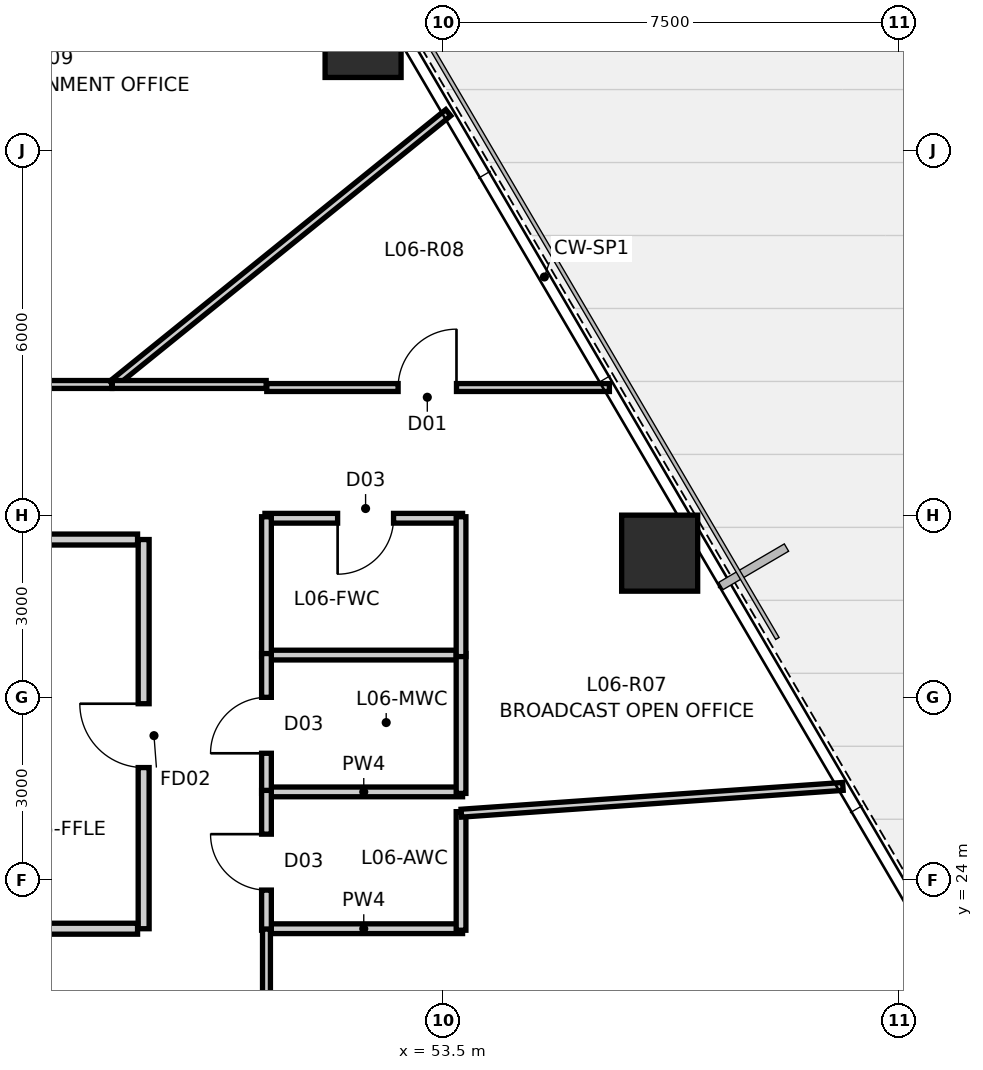
"""IFC4 building model, lengths in metres.
Left out: names, types, materials, properties, quantities, classifications, styles, units other than length and angle.
Written with IfcOpenShell. Run it as: python <this file> out.ifc"""

import sys

from ifc_helpers import new_model, si_unit, direction, frame, frame_2d, origin, origin_2d, place, context, subcontext, project, spatial, rectangle, hollow_rectangle, extrude, source, transform, mapped, element, fill, save


model = new_model("IFC4")
c1 = context("Model", 3, precision=1e-05, world=origin(), true_north=direction((0.0, 1.0)))
c2 = subcontext(c1, "Body", "Model", "MODEL_VIEW")
j1 = project(units=[si_unit("LENGTHUNIT", "METRE"), si_unit("PLANEANGLEUNIT", "RADIAN")], contexts=[c1])
p1 = place(None, origin())
s1 = spatial("IfcSite", under=j1, at=p1, CompositionType="ELEMENT")
p2 = place(p1, origin())
s2 = spatial("IfcBuilding", under=s1, at=p2, CompositionType="ELEMENT")
p3 = place(p2, frame((0.0, 0.0, 27.6)))
s3 = spatial("IfcBuildingStorey", under=s2, at=p3, CompositionType="ELEMENT", Elevation=27.6)
m1 = source(origin(), c2, "Body", "SweptSolid", [
    extrude(hollow_rectangle(XDim=1.25, YDim=1.25, WallThickness=0.07, at=origin_2d()), origin(), (0.0, 0.0, 1.0), 3.651),
])
p4 = place(p3, frame((57.066, 29.376, 0.0), z_axis=(-0.014913313399, -0.013776424037, 0.999793880369), x_axis=(0.678553674548, -0.734550822447, 0.0)))
e1 = element("IfcColumn", 1, at=p4, inside=s3, PredefinedType="COLUMN", context=c2, shape_type="MappedRepresentation", body=[
    mapped(m1, transform((0.0, 0.0, 0.0), scale=1.0)),
])
m2 = source(origin(), c2, "Body", "SweptSolid", [
    extrude(hollow_rectangle(XDim=1.25, YDim=1.25, WallThickness=0.07, at=origin_2d()), origin(), (0.0, 0.0, 1.0), 3.901),
])
p5 = place(p3, frame((52.189, 37.824, -0.25), z_axis=(-0.018151222073, -0.005633137885, 0.999819384136), x_axis=(0.296399214872, -0.955064136811, 0.0)))
e2 = element("IfcColumn", 2, at=p5, inside=s3, PredefinedType="COLUMN", context=c2, shape_type="MappedRepresentation", body=[
    mapped(m2, transform((0.0, 0.0, 0.0), scale=1.0)),
])
p6 = place(p3, frame((48.58, 23.2, 0.0), z_axis=(0.0, 0.0, 1.0), x_axis=(0.0, 1.0, 0.0)))
e3 = element("IfcWall", 3, at=p6, inside=s3, PredefinedType="PARTITIONING", context=c2, shape_type="SweptSolid", body=[
    extrude(rectangle(XDim=6.4, YDim=0.18, at=frame_2d((3.2, 0.0))), origin(), (0.0, 0.0, 1.0), 3.4),
])
p7 = place(p6, frame((2.65, 0.0, 0.0)))
e4 = element("IfcOpeningElement", 4, at=p7, cuts=e3, PredefinedType="OPENING", context=c2, shape_type="SweptSolid", body=[
    extrude(rectangle(XDim=1.05, YDim=2.15, at=frame_2d((0.525, 1.075))), frame((0.0, 0.102, 0.0), z_axis=(0.0, -1.0, 0.0), x_axis=(1.0, 0.0, 0.0)), (0.0, 0.0, 1.0), 0.204),
])
p8 = place(p3, frame((45.72, 23.2, 0.0), z_axis=(0.0, 0.0, 1.0), x_axis=(1.0, 0.0, 0.0)))
e5 = element("IfcWall", 5, at=p8, inside=s3, PredefinedType="PARTITIONING", context=c2, shape_type="SweptSolid", body=[
    extrude(rectangle(XDim=2.76, YDim=0.18, at=frame_2d((1.38, 0.0))), origin(), (0.0, 0.0, 1.0), 3.4),
])
p9 = place(p3, frame((45.72, 29.6, 0.0), z_axis=(0.0, 0.0, 1.0), x_axis=(1.0, 0.0, 0.0)))
e6 = element("IfcWall", 6, at=p9, inside=s3, PredefinedType="PARTITIONING", context=c2, shape_type="SweptSolid", body=[
    extrude(rectangle(XDim=2.76, YDim=0.18, at=frame_2d((1.38, 0.0))), origin(), (0.0, 0.0, 1.0), 2.783),
])
for number, where, z_axis, x_axis in (
    (7, (50.575, 23.2, 0.0), (0.0, 0.0, 1.0), (1.0, 0.0, 0.0)),
    (8, (50.575, 25.45, 0.0), (0.0, 0.0, 1.0), (1.0, 0.0, 0.0)),
    (9, (50.575, 27.7, 0.0), (0.0, 0.0, 1.0), (1.0, 0.0, 0.0)),
):
    element("IfcWall", number, at=place(p3, frame(where, z_axis=z_axis, x_axis=x_axis)), inside=s3, PredefinedType="PLUMBINGWALL", context=c2, shape_type="SweptSolid", body=[
        extrude(rectangle(XDim=3.25, YDim=0.16, at=frame_2d((1.625, 0.0))), origin(), (0.0, 0.0, 1.0), 3.4),
    ])
p10 = place(p3, frame((53.825, 29.95, 0.0), z_axis=(0.0, 0.0, 1.0), x_axis=(-1.0, 0.0, 0.0)))
e10 = element("IfcWall", 10, at=p10, inside=s3, PredefinedType="PLUMBINGWALL", context=c2, shape_type="SweptSolid", body=[
    extrude(rectangle(XDim=3.25, YDim=0.16, at=frame_2d((1.625, 0.0))), origin(), (0.0, 0.0, 1.0), 2.783),
])
p11 = place(p10, frame((1.135, 0.0, 0.0)))
e11 = element("IfcOpeningElement", 11, at=p11, cuts=e10, PredefinedType="OPENING", context=c2, shape_type="SweptSolid", body=[
    extrude(rectangle(XDim=0.92, YDim=2.1, at=frame_2d((0.46, 1.05))), frame((0.0, 0.092, 0.0), z_axis=(0.0, -1.0, 0.0), x_axis=(1.0, 0.0, 0.0)), (0.0, 0.0, 1.0), 0.184),
])
p12 = place(p3, frame((50.6, 27.675, 0.0), z_axis=(0.0, 0.0, 1.0), x_axis=(0.0, 1.0, 0.0)))
e12 = element("IfcWall", 12, at=p12, inside=s3, PredefinedType="PLUMBINGWALL", context=c2, shape_type="SweptSolid", body=[
    extrude(rectangle(XDim=2.3, YDim=0.16, at=frame_2d((1.15, 0.0))), origin(), (0.0, 0.0, 1.0), 3.4),
])
p13 = place(p3, frame((50.6, 25.425, 0.0), z_axis=(0.0, 0.0, 1.0), x_axis=(0.0, 1.0, 0.0)))
e13 = element("IfcWall", 13, at=p13, inside=s3, PredefinedType="PLUMBINGWALL", context=c2, shape_type="SweptSolid", body=[
    extrude(rectangle(XDim=2.3, YDim=0.16, at=frame_2d((1.15, 0.0))), origin(), (0.0, 0.0, 1.0), 3.4),
])
p14 = place(p13, frame((0.66, 0.0, 0.0)))
e14 = element("IfcOpeningElement", 14, at=p14, cuts=e13, PredefinedType="OPENING", context=c2, shape_type="SweptSolid", body=[
    extrude(rectangle(XDim=0.92, YDim=2.1, at=frame_2d((0.46, 1.05))), frame((0.0, 0.092, 0.0), z_axis=(0.0, -1.0, 0.0), x_axis=(1.0, 0.0, 0.0)), (0.0, 0.0, 1.0), 0.184),
])
p15 = place(p3, frame((50.6, 23.175, 0.0), z_axis=(0.0, 0.0, 1.0), x_axis=(0.0, 1.0, 0.0)))
e15 = element("IfcWall", 15, at=p15, inside=s3, PredefinedType="PLUMBINGWALL", context=c2, shape_type="SweptSolid", body=[
    extrude(rectangle(XDim=2.3, YDim=0.16, at=frame_2d((1.15, 0.0))), origin(), (0.0, 0.0, 1.0), 3.026),
])
p16 = place(p15, frame((0.66, 0.0, 0.0)))
e16 = element("IfcOpeningElement", 16, at=p16, cuts=e15, PredefinedType="OPENING", context=c2, shape_type="SweptSolid", body=[
    extrude(rectangle(XDim=0.92, YDim=2.1, at=frame_2d((0.46, 1.05))), frame((0.0, 0.092, 0.0), z_axis=(0.0, -1.0, 0.0), x_axis=(1.0, 0.0, 0.0)), (0.0, 0.0, 1.0), 0.184),
])
for number, where, z_axis, x_axis in (
    (17, (53.8, 25.425, 0.0), (0.0, 0.0, 1.0), (0.0, 1.0, 0.0)),
    (18, (53.8, 27.675, 0.0), (0.0, 0.0, 1.0), (0.0, 1.0, 0.0)),
):
    element("IfcWall", number, at=place(p3, frame(where, z_axis=z_axis, x_axis=x_axis)), inside=s3, PredefinedType="PLUMBINGWALL", context=c2, shape_type="SweptSolid", body=[
        extrude(rectangle(XDim=2.3, YDim=0.16, at=frame_2d((1.15, 0.0))), origin(), (0.0, 0.0, 1.0), 3.026),
    ])
p17 = place(p3, frame((53.8, 23.175, 0.0), z_axis=(0.0, 0.0, 1.0), x_axis=(0.0, 1.0, 0.0)))
e19 = element("IfcWall", 19, at=p17, inside=s3, PredefinedType="PLUMBINGWALL", context=c2, shape_type="SweptSolid", body=[
    extrude(rectangle(XDim=1.95, YDim=0.16, at=frame_2d((0.975, 0.0))), origin(), (0.0, 0.0, 1.0), 3.4),
])
p18 = place(p3, frame((40.345, 32.15, 0.0), z_axis=(0.0, 0.0, 1.0), x_axis=(1.0, 0.0, 0.0)))
e20 = element("IfcWall", 20, at=p18, inside=s3, PredefinedType="PARTITIONING", context=c2, shape_type="SweptSolid", body=[
    extrude(rectangle(XDim=7.71, YDim=0.13, at=frame_2d((3.855, 0.0))), origin(), (0.0, 0.0, 1.0), 3.4),
])
p19 = place(p18, frame((3.375, 0.0, 0.0)))
e21 = element("IfcOpeningElement", 21, at=p19, cuts=e20, PredefinedType="OPENING", context=c2, shape_type="SweptSolid", body=[
    extrude(rectangle(XDim=0.96, YDim=2.15, at=frame_2d((0.48, 1.075))), frame((0.0, 0.077, 0.0), z_axis=(0.0, -1.0, 0.0), x_axis=(1.0, 0.0, 0.0)), (0.0, 0.0, 1.0), 0.154),
])
p20 = place(p3, frame((48.064, 32.153, 0.0), z_axis=(0.0, 0.0, 1.0), x_axis=(0.777691139516, 0.628646555322, 0.0)))
e22 = element("IfcWall", 22, at=p20, inside=s3, PredefinedType="PARTITIONING", context=c2, shape_type="SweptSolid", body=[
    extrude(rectangle(XDim=7.106, YDim=0.13, at=frame_2d((3.553, 0.0))), origin(), (0.0, 0.0, 1.0), 3.4),
])
p21 = place(p3, frame((53.805, 25.1, 0.0), z_axis=(0.0, 0.0, 1.0), x_axis=(0.997551418552, 0.069936881151, 0.0)))
e23 = element("IfcWall", 23, at=p21, inside=s3, PredefinedType="PARTITIONING", context=c2, shape_type="SweptSolid", body=[
    extrude(rectangle(XDim=6.291, YDim=0.13, at=frame_2d((3.145, 0.0))), origin(), (0.0, 0.0, 1.0), 3.4),
])
p22 = place(p3, frame((50.6, 17.105, 0.0), z_axis=(0.0, 0.0, 1.0), x_axis=(0.0, 1.0, 0.0)))
e24 = element("IfcWall", 24, at=p22, inside=s3, PredefinedType="PARTITIONING", context=c2, shape_type="SweptSolid", body=[
    extrude(rectangle(XDim=6.09, YDim=0.13, at=frame_2d((3.045, 0.0))), origin(), (0.0, 0.0, 1.0), 3.026),
])
p23 = place(p3, frame((50.605, 32.1, 0.0), z_axis=(0.0, 0.0, 1.0), x_axis=(1.0, 0.0, 0.0)))
e25 = element("IfcWall", 25, at=p23, inside=s3, PredefinedType="PARTITIONING", context=c2, shape_type="SweptSolid", body=[
    extrude(rectangle(XDim=5.635, YDim=0.13, at=frame_2d((2.817, 0.0))), origin(), (0.0, 0.0, 1.0), 3.4),
])
p24 = place(p23, frame((2.16, 0.0, 0.0)))
e26 = element("IfcOpeningElement", 26, at=p24, cuts=e25, PredefinedType="OPENING", context=c2, shape_type="SweptSolid", body=[
    extrude(rectangle(XDim=0.96, YDim=2.15, at=frame_2d((0.48, 1.075))), frame((0.0, 0.077, 0.0), z_axis=(0.0, -1.0, 0.0), x_axis=(1.0, 0.0, 0.0)), (0.0, 0.0, 1.0), 0.154),
])
p25 = place(p3, frame((48.065, 32.15, 0.0), z_axis=(0.0, 0.0, 1.0), x_axis=(1.0, 0.0, 0.0)))
e27 = element("IfcWall", 27, at=p25, inside=s3, PredefinedType="PARTITIONING", context=c2, shape_type="SweptSolid", body=[
    extrude(rectangle(XDim=2.53, YDim=0.13, at=frame_2d((1.265, 0.0))), origin(), (0.0, 0.0, 1.0), 3.4),
])
p26 = place(p7, origin())
e28 = element("IfcDoor", 28, at=p26, inside=s3, OperationType="SINGLE_SWING_RIGHT", PredefinedType="DOOR", context=c2, shape_type="SweptSolid", body=[
    extrude(rectangle(XDim=1.05, YDim=2.15, at=frame_2d((0.525, 1.075))), frame((0.0, 0.025, 0.0), z_axis=(0.0, -1.0, 0.0), x_axis=(1.0, 0.0, 0.0)), (0.0, 0.0, 1.0), 0.05),
])
fill(e4, e28)
p27 = place(p11, origin())
e29 = element("IfcDoor", 29, at=p27, inside=s3, OperationType="SINGLE_SWING_RIGHT", PredefinedType="DOOR", context=c2, shape_type="SweptSolid", body=[
    extrude(rectangle(XDim=0.92, YDim=2.1, at=frame_2d((0.46, 1.05))), frame((0.0, 0.025, 0.0), z_axis=(0.0, -1.0, 0.0), x_axis=(1.0, 0.0, 0.0)), (0.0, 0.0, 1.0), 0.05),
])
fill(e11, e29)
p28 = place(p14, origin())
e30 = element("IfcDoor", 30, at=p28, inside=s3, OperationType="SINGLE_SWING_LEFT", PredefinedType="DOOR", context=c2, shape_type="SweptSolid", body=[
    extrude(rectangle(XDim=0.92, YDim=2.1, at=frame_2d((0.46, 1.05))), frame((0.0, 0.025, 0.0), z_axis=(0.0, -1.0, 0.0), x_axis=(1.0, 0.0, 0.0)), (0.0, 0.0, 1.0), 0.05),
])
fill(e14, e30)
p29 = place(p16, origin())
e31 = element("IfcDoor", 31, at=p29, inside=s3, OperationType="SINGLE_SWING_RIGHT", PredefinedType="DOOR", context=c2, shape_type="SweptSolid", body=[
    extrude(rectangle(XDim=0.92, YDim=2.1, at=frame_2d((0.46, 1.05))), frame((0.0, 0.025, 0.0), z_axis=(0.0, -1.0, 0.0), x_axis=(1.0, 0.0, 0.0)), (0.0, 0.0, 1.0), 0.05),
])
fill(e16, e31)
p30 = place(p24, origin())
e32 = element("IfcDoor", 32, at=p30, inside=s3, OperationType="SINGLE_SWING_RIGHT", PredefinedType="DOOR", context=c2, shape_type="SweptSolid", body=[
    extrude(rectangle(XDim=0.96, YDim=2.15, at=frame_2d((0.48, 1.075))), frame((0.0, 0.025, 0.0), z_axis=(0.0, -1.0, 0.0), x_axis=(1.0, 0.0, 0.0)), (0.0, 0.0, 1.0), 0.05),
])
fill(e26, e32)
save(model, sys.argv[1])
